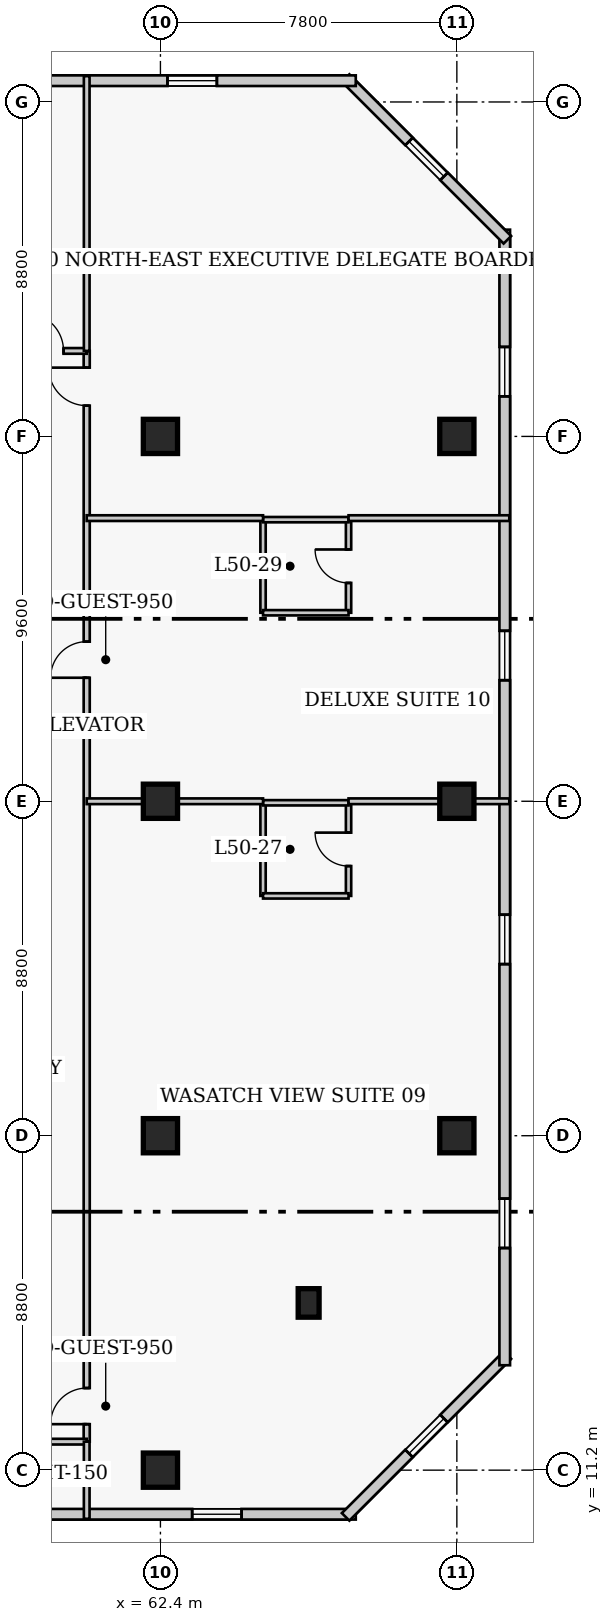
"""IFC4 building model, lengths in metres.
Left out: names, types, materials, properties, quantities, classifications, styles, units other than length and angle.
Written with IfcOpenShell. Run it as: python <this file> out.ifc"""

import sys

from ifc_helpers import new_model, si_unit, direction, frame, frame_2d, origin, origin_2d, place, context, subcontext, project, spatial, rectangle, extrude, element, fill, save


model = new_model("IFC4")
c1 = context("Model", 3, precision=1e-05, world=origin(), true_north=direction((0.0, 1.0)))
c2 = subcontext(c1, "Body", "Model", "MODEL_VIEW")
j1 = project(units=[si_unit("LENGTHUNIT", "METRE"), si_unit("PLANEANGLEUNIT", "RADIAN")], contexts=[c1])
p1 = place(None, origin())
s1 = spatial("IfcSite", under=j1, at=p1, CompositionType="ELEMENT")
p2 = place(p1, origin())
s2 = spatial("IfcBuilding", under=s1, at=p2, CompositionType="ELEMENT")
p3 = place(p2, frame((0.0, 0.0, 200.7)))
s3 = spatial("IfcBuildingStorey", under=s2, at=p3, CompositionType="ELEMENT", Elevation=200.7)
for number, where, z_axis, x_axis in (
    (1, (62.4, 11.2, 0.0), (0.0, 0.0, 1.0), (1.0, 0.0, 0.0)),
    (2, (62.4, 20.0, 0.0), (0.0, 0.0, 1.0), (1.0, 0.0, 0.0)),
    (3, (62.4, 28.8, 0.0), (0.0, 0.0, 1.0), (1.0, 0.0, 0.0)),
    (4, (62.4, 38.4, 0.0), (0.0, 0.0, 1.0), (1.0, 0.0, 0.0)),
    (5, (70.2, 20.0, 0.0), (0.0, 0.0, 1.0), (1.0, 0.0, 0.0)),
    (6, (70.2, 28.8, 0.0), (0.0, 0.0, 1.0), (1.0, 0.0, 0.0)),
    (7, (70.2, 38.4, 0.0), (0.0, 0.0, 1.0), (1.0, 0.0, 0.0)),
):
    element("IfcColumn", number, at=place(p3, frame(where, z_axis=z_axis, x_axis=x_axis)), inside=s3, PredefinedType="COLUMN", context=c2, shape_type="SweptSolid", body=[
        extrude(rectangle(XDim=0.9, YDim=0.9, at=origin_2d()), origin(), (0.0, 0.0, 1.0), 3.9),
    ])
p4 = place(p3, frame((66.3, 15.6, 0.0), z_axis=(0.0, 0.0, 1.0), x_axis=(1.0, 0.0, 0.0)))
e8 = element("IfcColumn", 8, at=p4, inside=s3, PredefinedType="PILASTER", context=c2, shape_type="SweptSolid", body=[
    extrude(rectangle(XDim=0.55, YDim=0.75, at=origin_2d()), origin(), (0.0, 0.0, 1.0), 3.9),
])
p5 = place(p3, frame((41.71, 10.04, 0.0), z_axis=(0.0, 0.0, 1.0), x_axis=(1.0, 0.0, 0.0)))
e9 = element("IfcWall", 9, at=p5, inside=s3, PredefinedType="SOLIDWALL", context=c2, shape_type="SweptSolid", body=[
    extrude(rectangle(XDim=25.83, YDim=0.28, at=frame_2d((12.915, 0.0))), origin(), (0.0, 0.0, 1.0), 3.65),
])
p6 = place(p5, frame((3.005, 0.0, 0.85)))
e10 = element("IfcOpeningElement", 10, at=p6, cuts=e9, PredefinedType="OPENING", context=c2, shape_type="SweptSolid", body=[
    extrude(rectangle(XDim=1.3, YDim=1.7, at=frame_2d((0.65, 0.85))), frame((0.0, 0.15, 0.0), z_axis=(0.0, -1.0, 0.0), x_axis=(1.0, 0.0, 0.0)), (0.0, 0.0, 1.0), 0.3),
])
p7 = place(p5, frame((13.415, 0.0, 0.85)))
e11 = element("IfcOpeningElement", 11, at=p7, cuts=e9, PredefinedType="OPENING", context=c2, shape_type="SweptSolid", body=[
    extrude(rectangle(XDim=1.3, YDim=1.7, at=frame_2d((0.65, 0.85))), frame((0.0, 0.15, 0.0), z_axis=(0.0, -1.0, 0.0), x_axis=(1.0, 0.0, 0.0)), (0.0, 0.0, 1.0), 0.3),
])
p8 = place(p5, frame((21.525, 0.0, 0.85)))
e12 = element("IfcOpeningElement", 12, at=p8, cuts=e9, PredefinedType="OPENING", context=c2, shape_type="SweptSolid", body=[
    extrude(rectangle(XDim=1.3, YDim=1.7, at=frame_2d((0.65, 0.85))), frame((0.0, 0.15, 0.0), z_axis=(0.0, -1.0, 0.0), x_axis=(1.0, 0.0, 0.0)), (0.0, 0.0, 1.0), 0.3),
])
p9 = place(p3, frame((67.273, 9.971, 0.0), z_axis=(0.0, 0.0, 1.0), x_axis=(0.707106781187, 0.707106781187, 0.0)))
e13 = element("IfcWall", 13, at=p9, inside=s3, PredefinedType="SOLIDWALL", context=c2, shape_type="SweptSolid", body=[
    extrude(rectangle(XDim=6.02, YDim=0.28, at=frame_2d((3.01, 0.0))), origin(), (0.0, 0.0, 1.0), 3.65),
])
p10 = place(p9, frame((2.36, 0.0, 0.85)))
e14 = element("IfcOpeningElement", 14, at=p10, cuts=e13, PredefinedType="OPENING", context=c2, shape_type="SweptSolid", body=[
    extrude(rectangle(XDim=1.3, YDim=1.7, at=frame_2d((0.65, 0.85))), frame((0.0, 0.15, 0.0), z_axis=(0.0, -1.0, 0.0), x_axis=(1.0, 0.0, 0.0)), (0.0, 0.0, 1.0), 0.3),
])
p11 = place(p3, frame((71.46, 13.96, 0.0), z_axis=(0.0, 0.0, 1.0), x_axis=(0.0, 1.0, 0.0)))
e15 = element("IfcWall", 15, at=p11, inside=s3, PredefinedType="SOLIDWALL", context=c2, shape_type="SweptSolid", body=[
    extrude(rectangle(XDim=29.88, YDim=0.28, at=frame_2d((14.94, 0.0))), origin(), (0.0, 0.0, 1.0), 3.65),
])
p12 = place(p11, frame((3.085, 0.0, 0.85)))
e16 = element("IfcOpeningElement", 16, at=p12, cuts=e15, PredefinedType="OPENING", context=c2, shape_type="SweptSolid", body=[
    extrude(rectangle(XDim=1.3, YDim=1.7, at=frame_2d((0.65, 0.85))), frame((0.0, 0.15, 0.0), z_axis=(0.0, -1.0, 0.0), x_axis=(1.0, 0.0, 0.0)), (0.0, 0.0, 1.0), 0.3),
])
p13 = place(p11, frame((10.555, 0.0, 0.85)))
e17 = element("IfcOpeningElement", 17, at=p13, cuts=e15, PredefinedType="OPENING", context=c2, shape_type="SweptSolid", body=[
    extrude(rectangle(XDim=1.3, YDim=1.7, at=frame_2d((0.65, 0.85))), frame((0.0, 0.15, 0.0), z_axis=(0.0, -1.0, 0.0), x_axis=(1.0, 0.0, 0.0)), (0.0, 0.0, 1.0), 0.3),
])
p14 = place(p11, frame((18.025, 0.0, 0.85)))
e18 = element("IfcOpeningElement", 18, at=p14, cuts=e15, PredefinedType="OPENING", context=c2, shape_type="SweptSolid", body=[
    extrude(rectangle(XDim=1.3, YDim=1.7, at=frame_2d((0.65, 0.85))), frame((0.0, 0.15, 0.0), z_axis=(0.0, -1.0, 0.0), x_axis=(1.0, 0.0, 0.0)), (0.0, 0.0, 1.0), 0.3),
])
p15 = place(p11, frame((25.495, 0.0, 0.85)))
e19 = element("IfcOpeningElement", 19, at=p15, cuts=e15, PredefinedType="OPENING", context=c2, shape_type="SweptSolid", body=[
    extrude(rectangle(XDim=1.3, YDim=1.7, at=frame_2d((0.65, 0.85))), frame((0.0, 0.15, 0.0), z_axis=(0.0, -1.0, 0.0), x_axis=(1.0, 0.0, 0.0)), (0.0, 0.0, 1.0), 0.3),
])
p16 = place(p3, frame((71.529, 43.573, 0.0), z_axis=(0.0, 0.0, 1.0), x_axis=(-0.707106781187, 0.707106781187, 0.0)))
e20 = element("IfcWall", 20, at=p16, inside=s3, PredefinedType="SOLIDWALL", context=c2, shape_type="SweptSolid", body=[
    extrude(rectangle(XDim=6.02, YDim=0.28, at=frame_2d((3.01, 0.0))), origin(), (0.0, 0.0, 1.0), 3.65),
])
p17 = place(p16, frame((2.36, 0.0, 0.85)))
e21 = element("IfcOpeningElement", 21, at=p17, cuts=e20, PredefinedType="OPENING", context=c2, shape_type="SweptSolid", body=[
    extrude(rectangle(XDim=1.3, YDim=1.7, at=frame_2d((0.65, 0.85))), frame((0.0, 0.15, 0.0), z_axis=(0.0, -1.0, 0.0), x_axis=(1.0, 0.0, 0.0)), (0.0, 0.0, 1.0), 0.3),
])
p18 = place(p3, frame((67.54, 47.76, 0.0), z_axis=(0.0, 0.0, 1.0), x_axis=(-1.0, 0.0, 0.0)))
e22 = element("IfcWall", 22, at=p18, inside=s3, PredefinedType="SOLIDWALL", context=c2, shape_type="SweptSolid", body=[
    extrude(rectangle(XDim=25.83, YDim=0.28, at=frame_2d((12.915, 0.0))), origin(), (0.0, 0.0, 1.0), 3.65),
])
p19 = place(p18, frame((3.655, 0.0, 0.85)))
e23 = element("IfcOpeningElement", 23, at=p19, cuts=e22, PredefinedType="OPENING", context=c2, shape_type="SweptSolid", body=[
    extrude(rectangle(XDim=1.3, YDim=1.7, at=frame_2d((0.65, 0.85))), frame((0.0, 0.15, 0.0), z_axis=(0.0, -1.0, 0.0), x_axis=(1.0, 0.0, 0.0)), (0.0, 0.0, 1.0), 0.3),
])
p20 = place(p18, frame((22.025, 0.0, 0.85)))
e24 = element("IfcOpeningElement", 24, at=p20, cuts=e22, PredefinedType="OPENING", context=c2, shape_type="SweptSolid", body=[
    extrude(rectangle(XDim=1.3, YDim=1.7, at=frame_2d((0.65, 0.85))), frame((0.0, 0.15, 0.0), z_axis=(0.0, -1.0, 0.0), x_axis=(1.0, 0.0, 0.0)), (0.0, 0.0, 1.0), 0.3),
])
p21 = place(p3, frame((60.46, 11.95, 0.0), z_axis=(0.0, 0.0, 1.0), x_axis=(0.0, 1.0, 0.0)))
e25 = element("IfcWall", 25, at=p21, inside=s3, PredefinedType="PARTITIONING", context=c2, shape_type="SweptSolid", body=[
    extrude(rectangle(XDim=28.7, YDim=0.16, at=frame_2d((14.35, 0.0))), origin(), (0.0, 0.0, 1.0), 3.65),
])
p22 = place(p21, frame((0.46, 0.0, 0.0)))
e26 = element("IfcOpeningElement", 26, at=p22, cuts=e25, PredefinedType="OPENING", context=c2, shape_type="SweptSolid", body=[
    extrude(rectangle(XDim=0.95, YDim=2.1, at=frame_2d((0.475, 1.05))), frame((0.0, 0.09, 0.0), z_axis=(0.0, -1.0, 0.0), x_axis=(1.0, 0.0, 0.0)), (0.0, 0.0, 1.0), 0.18),
])
p23 = place(p21, frame((20.1, 0.0, 0.0)))
e27 = element("IfcOpeningElement", 27, at=p23, cuts=e25, PredefinedType="OPENING", context=c2, shape_type="SweptSolid", body=[
    extrude(rectangle(XDim=0.95, YDim=2.1, at=frame_2d((0.475, 1.05))), frame((0.0, 0.09, 0.0), z_axis=(0.0, -1.0, 0.0), x_axis=(1.0, 0.0, 0.0)), (0.0, 0.0, 1.0), 0.18),
])
p24 = place(p21, frame((27.26, 0.0, 0.0)))
e28 = element("IfcOpeningElement", 28, at=p24, cuts=e25, PredefinedType="OPENING", context=c2, shape_type="SweptSolid", body=[
    extrude(rectangle(XDim=1.0, YDim=2.15, at=frame_2d((0.5, 1.075))), frame((0.0, 0.09, 0.0), z_axis=(0.0, -1.0, 0.0), x_axis=(1.0, 0.0, 0.0)), (0.0, 0.0, 1.0), 0.18),
])
p25 = place(p3, frame((58.24, 11.95, 0.0), z_axis=(0.0, 0.0, 1.0), x_axis=(1.0, 0.0, 0.0)))
e29 = element("IfcWall", 29, at=p25, inside=s3, PredefinedType="PARTITIONING", context=c2, shape_type="SweptSolid", body=[
    extrude(rectangle(XDim=2.22, YDim=0.15, at=frame_2d((1.11, 0.0))), origin(), (0.0, 0.0, 1.0), 3.65),
])
p26 = place(p3, frame((56.8, 40.65, 0.0), z_axis=(0.0, 0.0, 1.0), x_axis=(1.0, 0.0, 0.0)))
e30 = element("IfcWall", 30, at=p26, inside=s3, PredefinedType="PARTITIONING", context=c2, shape_type="SweptSolid", body=[
    extrude(rectangle(XDim=3.66, YDim=0.15, at=frame_2d((1.83, 0.0))), origin(), (0.0, 0.0, 1.0), 3.65),
])
p27 = place(p26, frame((2.05, 0.0, 0.0)))
e31 = element("IfcOpeningElement", 31, at=p27, cuts=e30, PredefinedType="OPENING", context=c2, shape_type="SweptSolid", body=[
    extrude(rectangle(XDim=1.0, YDim=2.15, at=frame_2d((0.5, 1.075))), frame((0.0, 0.085, 0.0), z_axis=(0.0, -1.0, 0.0), x_axis=(1.0, 0.0, 0.0)), (0.0, 0.0, 1.0), 0.17),
])
p28 = place(p3, frame((60.46, 40.65, 0.0), z_axis=(0.0, 0.0, 1.0), x_axis=(0.0, 1.0, 0.0)))
e32 = element("IfcWall", 32, at=p28, inside=s3, PredefinedType="PARTITIONING", context=c2, shape_type="SweptSolid", body=[
    extrude(rectangle(XDim=7.23, YDim=0.15, at=frame_2d((3.615, 0.0))), origin(), (0.0, 0.0, 1.0), 3.65),
])
p29 = place(p3, frame((60.46, 9.92, 0.0), z_axis=(0.0, 0.0, 1.0), x_axis=(0.0, 1.0, 0.0)))
e33 = element("IfcWall", 33, at=p29, inside=s3, PredefinedType="PARTITIONING", context=c2, shape_type="SweptSolid", body=[
    extrude(rectangle(XDim=2.03, YDim=0.15, at=frame_2d((1.015, 0.0))), origin(), (0.0, 0.0, 1.0), 3.65),
])
p30 = place(p3, frame((65.1, 26.31, 0.0), z_axis=(0.0, 0.0, 1.0), x_axis=(0.0, 1.0, 0.0)))
e34 = element("IfcWall", 34, at=p30, inside=s3, PredefinedType="PLUMBINGWALL", context=c2, shape_type="SweptSolid", body=[
    extrude(rectangle(XDim=2.45, YDim=0.14, at=frame_2d((1.225, 0.0))), origin(), (0.0, 0.0, 1.0), 3.65),
])
p31 = place(p3, frame((67.35, 26.31, 0.0), z_axis=(0.0, 0.0, 1.0), x_axis=(0.0, 1.0, 0.0)))
e35 = element("IfcWall", 35, at=p31, inside=s3, PredefinedType="PLUMBINGWALL", context=c2, shape_type="SweptSolid", body=[
    extrude(rectangle(XDim=2.45, YDim=0.14, at=frame_2d((1.225, 0.0))), origin(), (0.0, 0.0, 1.0), 3.65),
])
p32 = place(p31, frame((0.785, 0.0, 0.0)))
e36 = element("IfcOpeningElement", 36, at=p32, cuts=e35, PredefinedType="OPENING", context=c2, shape_type="SweptSolid", body=[
    extrude(rectangle(XDim=0.88, YDim=2.05, at=frame_2d((0.44, 1.025))), frame((0.0, 0.08, 0.0), z_axis=(0.0, -1.0, 0.0), x_axis=(1.0, 0.0, 0.0)), (0.0, 0.0, 1.0), 0.16),
])
p33 = place(p3, frame((65.1, 26.31, 0.0), z_axis=(0.0, 0.0, 1.0), x_axis=(1.0, 0.0, 0.0)))
e37 = element("IfcWall", 37, at=p33, inside=s3, PredefinedType="PLUMBINGWALL", context=c2, shape_type="SweptSolid", body=[
    extrude(rectangle(XDim=2.25, YDim=0.14, at=frame_2d((1.125, 0.0))), origin(), (0.0, 0.0, 1.0), 3.65),
])
p34 = place(p3, frame((65.1, 28.76, 0.0), z_axis=(0.0, 0.0, 1.0), x_axis=(1.0, 0.0, 0.0)))
e38 = element("IfcWall", 38, at=p34, inside=s3, PredefinedType="PLUMBINGWALL", context=c2, shape_type="SweptSolid", body=[
    extrude(rectangle(XDim=2.25, YDim=0.14, at=frame_2d((1.125, 0.0))), origin(), (0.0, 0.0, 1.0), 3.038),
])
p35 = place(p3, frame((60.46, 28.8, 0.0), z_axis=(0.0, 0.0, 1.0), x_axis=(1.0, 0.0, 0.0)))
e39 = element("IfcWall", 39, at=p35, inside=s3, PredefinedType="PARTITIONING", context=c2, shape_type="SweptSolid", body=[
    extrude(rectangle(XDim=4.64, YDim=0.15, at=frame_2d((2.32, 0.0))), origin(), (0.0, 0.0, 1.0), 2.878),
])
p36 = place(p3, frame((67.35, 28.8, 0.0), z_axis=(0.0, 0.0, 1.0), x_axis=(1.0, 0.0, 0.0)))
e40 = element("IfcWall", 40, at=p36, inside=s3, PredefinedType="PARTITIONING", context=c2, shape_type="SweptSolid", body=[
    extrude(rectangle(XDim=4.23, YDim=0.15, at=frame_2d((2.115, 0.0))), origin(), (0.0, 0.0, 1.0), 2.878),
])
p37 = place(p3, frame((65.1, 33.76, 0.0), z_axis=(0.0, 0.0, 1.0), x_axis=(0.0, 1.0, 0.0)))
e41 = element("IfcWall", 41, at=p37, inside=s3, PredefinedType="PLUMBINGWALL", context=c2, shape_type="SweptSolid", body=[
    extrude(rectangle(XDim=2.45, YDim=0.14, at=frame_2d((1.225, 0.0))), origin(), (0.0, 0.0, 1.0), 3.65),
])
p38 = place(p3, frame((67.35, 33.76, 0.0), z_axis=(0.0, 0.0, 1.0), x_axis=(0.0, 1.0, 0.0)))
e42 = element("IfcWall", 42, at=p38, inside=s3, PredefinedType="PLUMBINGWALL", context=c2, shape_type="SweptSolid", body=[
    extrude(rectangle(XDim=2.45, YDim=0.14, at=frame_2d((1.225, 0.0))), origin(), (0.0, 0.0, 1.0), 3.65),
])
p39 = place(p38, frame((0.785, 0.0, 0.0)))
e43 = element("IfcOpeningElement", 43, at=p39, cuts=e42, PredefinedType="OPENING", context=c2, shape_type="SweptSolid", body=[
    extrude(rectangle(XDim=0.88, YDim=2.05, at=frame_2d((0.44, 1.025))), frame((0.0, 0.08, 0.0), z_axis=(0.0, -1.0, 0.0), x_axis=(1.0, 0.0, 0.0)), (0.0, 0.0, 1.0), 0.16),
])
for number, where, z_axis, x_axis in (
    (44, (65.1, 33.76, 0.0), (0.0, 0.0, 1.0), (1.0, 0.0, 0.0)),
    (45, (65.1, 36.21, 0.0), (0.0, 0.0, 1.0), (1.0, 0.0, 0.0)),
):
    element("IfcWall", number, at=place(p3, frame(where, z_axis=z_axis, x_axis=x_axis)), inside=s3, PredefinedType="PLUMBINGWALL", context=c2, shape_type="SweptSolid", body=[
        extrude(rectangle(XDim=2.25, YDim=0.14, at=frame_2d((1.125, 0.0))), origin(), (0.0, 0.0, 1.0), 3.65),
    ])
p40 = place(p3, frame((60.46, 36.25, 0.0), z_axis=(0.0, 0.0, 1.0), x_axis=(1.0, 0.0, 0.0)))
e46 = element("IfcWall", 46, at=p40, inside=s3, PredefinedType="PARTITIONING", context=c2, shape_type="SweptSolid", body=[
    extrude(rectangle(XDim=4.64, YDim=0.15, at=frame_2d((2.32, 0.0))), origin(), (0.0, 0.0, 1.0), 3.65),
])
p41 = place(p3, frame((67.35, 36.25, 0.0), z_axis=(0.0, 0.0, 1.0), x_axis=(1.0, 0.0, 0.0)))
e47 = element("IfcWall", 47, at=p41, inside=s3, PredefinedType="PARTITIONING", context=c2, shape_type="SweptSolid", body=[
    extrude(rectangle(XDim=4.23, YDim=0.15, at=frame_2d((2.115, 0.0))), origin(), (0.0, 0.0, 1.0), 3.65),
])
p42 = place(p8, origin())
e48 = element("IfcWindow", 48, at=p42, inside=s3, PartitioningType="SINGLE_PANEL", PredefinedType="WINDOW", context=c2, shape_type="SweptSolid", body=[
    extrude(rectangle(XDim=1.3, YDim=1.7, at=frame_2d((0.65, 0.85))), frame((0.0, 0.03, 0.0), z_axis=(0.0, -1.0, 0.0), x_axis=(1.0, 0.0, 0.0)), (0.0, 0.0, 1.0), 0.06),
])
fill(e12, e48)
p43 = place(p10, origin())
e49 = element("IfcWindow", 49, at=p43, inside=s3, PartitioningType="SINGLE_PANEL", PredefinedType="WINDOW", context=c2, shape_type="SweptSolid", body=[
    extrude(rectangle(XDim=1.3, YDim=1.7, at=frame_2d((0.65, 0.85))), frame((0.0, 0.03, 0.0), z_axis=(0.0, -1.0, 0.0), x_axis=(1.0, 0.0, 0.0)), (0.0, 0.0, 1.0), 0.06),
])
fill(e14, e49)
p44 = place(p12, origin())
e50 = element("IfcWindow", 50, at=p44, inside=s3, PartitioningType="SINGLE_PANEL", PredefinedType="WINDOW", context=c2, shape_type="SweptSolid", body=[
    extrude(rectangle(XDim=1.3, YDim=1.7, at=frame_2d((0.65, 0.85))), frame((0.0, 0.03, 0.0), z_axis=(0.0, -1.0, 0.0), x_axis=(1.0, 0.0, 0.0)), (0.0, 0.0, 1.0), 0.06),
])
fill(e16, e50)
p45 = place(p13, origin())
e51 = element("IfcWindow", 51, at=p45, inside=s3, PartitioningType="SINGLE_PANEL", PredefinedType="WINDOW", context=c2, shape_type="SweptSolid", body=[
    extrude(rectangle(XDim=1.3, YDim=1.7, at=frame_2d((0.65, 0.85))), frame((0.0, 0.03, 0.0), z_axis=(0.0, -1.0, 0.0), x_axis=(1.0, 0.0, 0.0)), (0.0, 0.0, 1.0), 0.06),
])
fill(e17, e51)
p46 = place(p14, origin())
e52 = element("IfcWindow", 52, at=p46, inside=s3, PartitioningType="SINGLE_PANEL", PredefinedType="WINDOW", context=c2, shape_type="SweptSolid", body=[
    extrude(rectangle(XDim=1.3, YDim=1.7, at=frame_2d((0.65, 0.85))), frame((0.0, 0.03, 0.0), z_axis=(0.0, -1.0, 0.0), x_axis=(1.0, 0.0, 0.0)), (0.0, 0.0, 1.0), 0.06),
])
fill(e18, e52)
p47 = place(p15, origin())
e53 = element("IfcWindow", 53, at=p47, inside=s3, PartitioningType="SINGLE_PANEL", PredefinedType="WINDOW", context=c2, shape_type="SweptSolid", body=[
    extrude(rectangle(XDim=1.3, YDim=1.7, at=frame_2d((0.65, 0.85))), frame((0.0, 0.03, 0.0), z_axis=(0.0, -1.0, 0.0), x_axis=(1.0, 0.0, 0.0)), (0.0, 0.0, 1.0), 0.06),
])
fill(e19, e53)
p48 = place(p17, origin())
e54 = element("IfcWindow", 54, at=p48, inside=s3, PartitioningType="SINGLE_PANEL", PredefinedType="WINDOW", context=c2, shape_type="SweptSolid", body=[
    extrude(rectangle(XDim=1.3, YDim=1.7, at=frame_2d((0.65, 0.85))), frame((0.0, 0.03, 0.0), z_axis=(0.0, -1.0, 0.0), x_axis=(1.0, 0.0, 0.0)), (0.0, 0.0, 1.0), 0.06),
])
fill(e21, e54)
p49 = place(p19, origin())
e55 = element("IfcWindow", 55, at=p49, inside=s3, PartitioningType="SINGLE_PANEL", PredefinedType="WINDOW", context=c2, shape_type="SweptSolid", body=[
    extrude(rectangle(XDim=1.3, YDim=1.7, at=frame_2d((0.65, 0.85))), frame((0.0, 0.03, 0.0), z_axis=(0.0, -1.0, 0.0), x_axis=(1.0, 0.0, 0.0)), (0.0, 0.0, 1.0), 0.06),
])
fill(e23, e55)
p50 = place(p27, origin())
e56 = element("IfcDoor", 56, at=p50, inside=s3, OperationType="SINGLE_SWING_LEFT", PredefinedType="DOOR", context=c2, shape_type="SweptSolid", body=[
    extrude(rectangle(XDim=1.0, YDim=2.15, at=frame_2d((0.5, 1.075))), frame((0.0, 0.025, 0.0), z_axis=(0.0, -1.0, 0.0), x_axis=(1.0, 0.0, 0.0)), (0.0, 0.0, 1.0), 0.05),
])
fill(e31, e56)
p51 = place(p32, origin())
e57 = element("IfcDoor", 57, at=p51, inside=s3, OperationType="SINGLE_SWING_RIGHT", PredefinedType="DOOR", context=c2, shape_type="SweptSolid", body=[
    extrude(rectangle(XDim=0.88, YDim=2.05, at=frame_2d((0.44, 1.025))), frame((0.0, 0.025, 0.0), z_axis=(0.0, -1.0, 0.0), x_axis=(1.0, 0.0, 0.0)), (0.0, 0.0, 1.0), 0.05),
])
fill(e36, e57)
p52 = place(p22, origin())
e58 = element("IfcDoor", 58, at=p52, inside=s3, OperationType="SINGLE_SWING_LEFT", PredefinedType="DOOR", context=c2, shape_type="SweptSolid", body=[
    extrude(rectangle(XDim=0.95, YDim=2.1, at=frame_2d((0.475, 1.05))), frame((0.0, 0.025, 0.0), z_axis=(0.0, -1.0, 0.0), x_axis=(1.0, 0.0, 0.0)), (0.0, 0.0, 1.0), 0.05),
])
fill(e26, e58)
p53 = place(p39, origin())
e59 = element("IfcDoor", 59, at=p53, inside=s3, OperationType="SINGLE_SWING_RIGHT", PredefinedType="DOOR", context=c2, shape_type="SweptSolid", body=[
    extrude(rectangle(XDim=0.88, YDim=2.05, at=frame_2d((0.44, 1.025))), frame((0.0, 0.025, 0.0), z_axis=(0.0, -1.0, 0.0), x_axis=(1.0, 0.0, 0.0)), (0.0, 0.0, 1.0), 0.05),
])
fill(e43, e59)
p54 = place(p23, origin())
e60 = element("IfcDoor", 60, at=p54, inside=s3, OperationType="SINGLE_SWING_LEFT", PredefinedType="DOOR", context=c2, shape_type="SweptSolid", body=[
    extrude(rectangle(XDim=0.95, YDim=2.1, at=frame_2d((0.475, 1.05))), frame((0.0, 0.025, 0.0), z_axis=(0.0, -1.0, 0.0), x_axis=(1.0, 0.0, 0.0)), (0.0, 0.0, 1.0), 0.05),
])
fill(e27, e60)
p55 = place(p24, origin())
e61 = element("IfcDoor", 61, at=p55, inside=s3, OperationType="SINGLE_SWING_RIGHT", PredefinedType="DOOR", context=c2, shape_type="SweptSolid", body=[
    extrude(rectangle(XDim=1.0, YDim=2.15, at=frame_2d((0.5, 1.075))), frame((0.0, 0.025, 0.0), z_axis=(0.0, -1.0, 0.0), x_axis=(1.0, 0.0, 0.0)), (0.0, 0.0, 1.0), 0.05),
])
fill(e28, e61)
save(model, sys.argv[1])
